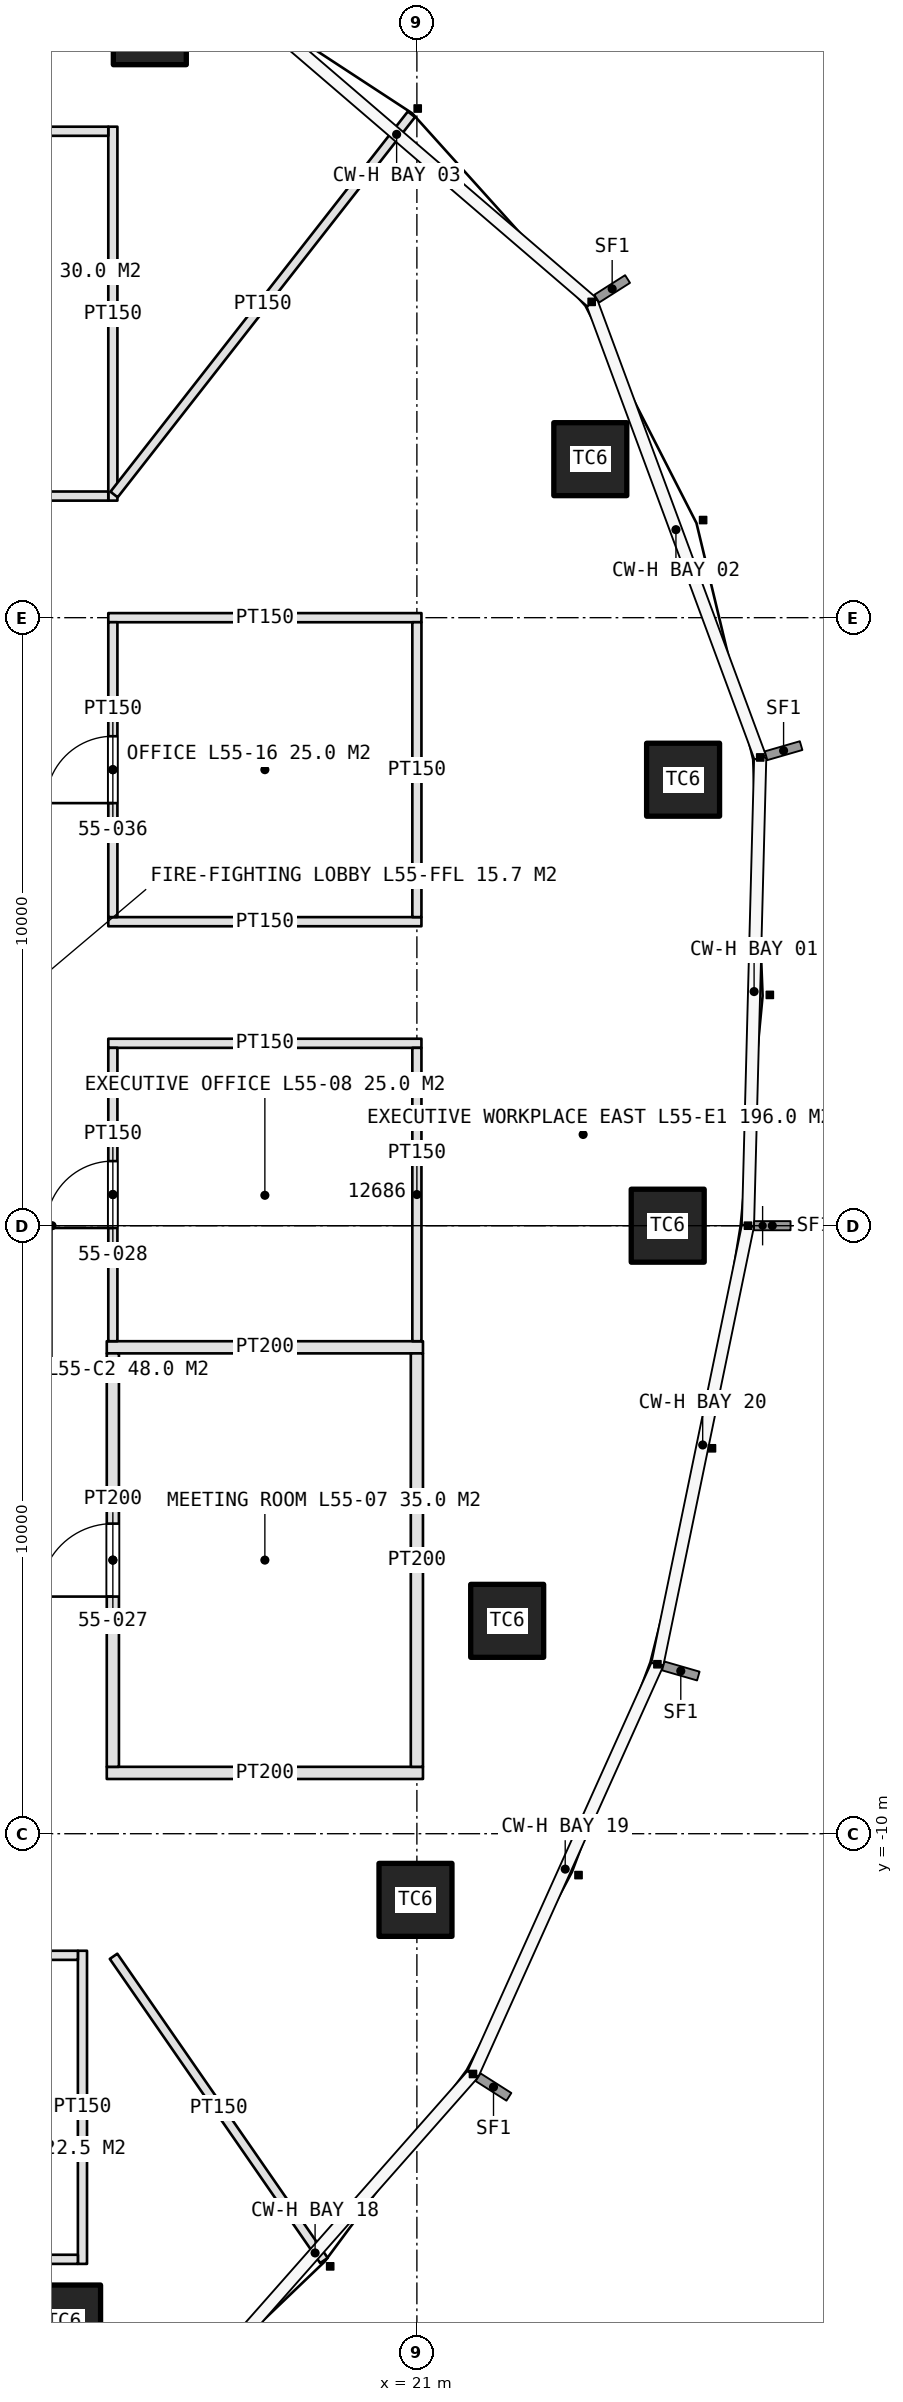
"""IFC4 building model, lengths in metres.
Left out: names, types, materials, properties, quantities, classifications, styles, units other than length and angle.
Written with IfcOpenShell. Run it as: python <this file> out.ifc"""

import sys

from ifc_helpers import new_model, si_unit, direction, frame, frame_2d, origin, origin_2d, place, context, subcontext, project, spatial, rectangle, extrude, element, fill, save


model = new_model("IFC4")
c1 = context("Model", 3, precision=1e-05, world=origin(), true_north=direction((0.0, 1.0)))
c2 = subcontext(c1, "Body", "Model", "MODEL_VIEW")
j1 = project(units=[si_unit("LENGTHUNIT", "METRE"), si_unit("PLANEANGLEUNIT", "RADIAN")], contexts=[c1])
p1 = place(None, origin())
s1 = spatial("IfcSite", under=j1, at=p1, CompositionType="ELEMENT")
p2 = place(p1, origin())
s2 = spatial("IfcBuilding", under=s1, at=p2, CompositionType="ELEMENT")
p3 = place(p2, frame((0.0, 0.0, 249.4)))
s3 = spatial("IfcBuildingStorey", under=s2, at=p3, CompositionType="ELEMENT", Elevation=249.4)
for number, where, z_axis, x_axis in (
    (1, (25.125, 0.0, 0.0), (0.0, 0.0, 1.0), (1.0, 0.0, 0.0)),
    (2, (25.378, 7.335, 0.0), (0.0, 0.0, 1.0), (1.0, 0.0, 0.0)),
    (3, (23.852, 12.607, 0.0), (0.0, 0.0, 1.0), (1.0, 0.0, 0.0)),
    (4, (16.608, 19.695, 0.0), (0.0, 0.0, 1.0), (1.0, 0.0, 0.0)),
    (5, (15.198, -18.023, 0.0), (0.0, 0.0, 1.0), (1.0, 0.0, 0.0)),
    (6, (20.977, -11.088, 0.0), (0.0, 0.0, 1.0), (1.0, 0.0, 0.0)),
    (7, (22.485, -6.499, 0.0), (0.0, 0.0, 1.0), (1.0, 0.0, 0.0)),
):
    element("IfcColumn", number, at=place(p3, frame(where, z_axis=z_axis, x_axis=x_axis)), inside=s3, PredefinedType="COLUMN", context=c2, shape_type="SweptSolid", body=[
        extrude(rectangle(XDim=1.2, YDim=1.2, at=origin_2d()), origin(), (0.0, 0.0, 1.0), 4.2),
    ])
p4 = place(p3, frame((16.0, 11.925, 0.0), z_axis=(0.0, 0.0, 1.0), x_axis=(0.0, 1.0, 0.0)))
e8 = element("IfcWall", 8, at=p4, inside=s3, PredefinedType="PARTITIONING", context=c2, shape_type="SweptSolid", body=[
    extrude(rectangle(XDim=6.15, YDim=0.15, at=frame_2d((3.075, 0.0))), origin(), (0.0, 0.0, 1.0), 3.0),
])
p5 = place(p3, frame((11.075, 12.0, 0.0), z_axis=(0.0, 0.0, 1.0), x_axis=(1.0, 0.0, 0.0)))
e9 = element("IfcWall", 9, at=p5, inside=s3, PredefinedType="PARTITIONING", context=c2, shape_type="SweptSolid", body=[
    extrude(rectangle(XDim=4.85, YDim=0.15, at=frame_2d((2.425, 0.0))), origin(), (0.0, 0.0, 1.0), 3.0),
])
p6 = place(p5, frame((1.875, 0.0, 0.0)))
e10 = element("IfcOpeningElement", 10, at=p6, cuts=e9, PredefinedType="OPENING", context=c2, shape_type="SweptSolid", body=[
    extrude(rectangle(XDim=1.1, YDim=2.3, at=frame_2d((0.55, 1.15))), frame((0.0, 0.085, 0.0), z_axis=(0.0, -1.0, 0.0), x_axis=(1.0, 0.0, 0.0)), (0.0, 0.0, 1.0), 0.17),
])
p7 = place(p3, frame((11.075, 18.0, 0.0), z_axis=(0.0, 0.0, 1.0), x_axis=(1.0, 0.0, 0.0)))
e11 = element("IfcWall", 11, at=p7, inside=s3, PredefinedType="PARTITIONING", context=c2, shape_type="SweptSolid", body=[
    extrude(rectangle(XDim=4.85, YDim=0.15, at=frame_2d((2.425, 0.0))), origin(), (0.0, 0.0, 1.0), 3.0),
])
for number, where, z_axis, x_axis in (
    (12, (15.9, -9.0, 0.0), (0.0, 0.0, 1.0), (1.0, 0.0, 0.0)),
    (13, (15.9, -2.0, 0.0), (0.0, 0.0, 1.0), (1.0, 0.0, 0.0)),
):
    element("IfcWall", number, at=place(p3, frame(where, z_axis=z_axis, x_axis=x_axis)), inside=s3, PredefinedType="PARTITIONING", context=c2, shape_type="SweptSolid", body=[
        extrude(rectangle(XDim=5.2, YDim=0.2, at=frame_2d((2.6, 0.0))), origin(), (0.0, 0.0, 1.0), 3.0),
    ])
p8 = place(p3, frame((15.925, 3.0, 0.0), z_axis=(0.0, 0.0, 1.0), x_axis=(1.0, 0.0, 0.0)))
e14 = element("IfcWall", 14, at=p8, inside=s3, PredefinedType="PARTITIONING", context=c2, shape_type="SweptSolid", body=[
    extrude(rectangle(XDim=5.15, YDim=0.15, at=frame_2d((2.575, 0.0))), origin(), (0.0, 0.0, 1.0), 3.0),
])
p9 = place(p3, frame((16.0, -8.9, 0.0), z_axis=(0.0, 0.0, 1.0), x_axis=(0.0, 1.0, 0.0)))
e15 = element("IfcWall", 15, at=p9, inside=s3, PredefinedType="PARTITIONING", context=c2, shape_type="SweptSolid", body=[
    extrude(rectangle(XDim=6.8, YDim=0.2, at=frame_2d((3.4, 0.0))), origin(), (0.0, 0.0, 1.0), 3.0),
])
p10 = place(p9, frame((2.8, 0.0, 0.0)))
e16 = element("IfcOpeningElement", 16, at=p10, cuts=e15, PredefinedType="OPENING", context=c2, shape_type="SweptSolid", body=[
    extrude(rectangle(XDim=1.2, YDim=2.4, at=frame_2d((0.6, 1.2))), frame((0.0, 0.11, 0.0), z_axis=(0.0, -1.0, 0.0), x_axis=(1.0, 0.0, 0.0)), (0.0, 0.0, 1.0), 0.22),
])
p11 = place(p3, frame((21.0, -8.9, 0.0), z_axis=(0.0, 0.0, 1.0), x_axis=(0.0, 1.0, 0.0)))
e17 = element("IfcWall", 17, at=p11, inside=s3, PredefinedType="PARTITIONING", context=c2, shape_type="SweptSolid", body=[
    extrude(rectangle(XDim=6.8, YDim=0.2, at=frame_2d((3.4, 0.0))), origin(), (0.0, 0.0, 1.0), 3.0),
])
p12 = place(p3, frame((16.0, -1.9, 0.0), z_axis=(0.0, 0.0, 1.0), x_axis=(0.0, 1.0, 0.0)))
e18 = element("IfcWall", 18, at=p12, inside=s3, PredefinedType="PARTITIONING", context=c2, shape_type="SweptSolid", body=[
    extrude(rectangle(XDim=4.825, YDim=0.15, at=frame_2d((2.413, 0.0))), origin(), (0.0, 0.0, 1.0), 3.0),
])
p13 = place(p12, frame((1.863, 0.0, 0.0)))
e19 = element("IfcOpeningElement", 19, at=p13, cuts=e18, PredefinedType="OPENING", context=c2, shape_type="SweptSolid", body=[
    extrude(rectangle(XDim=1.1, YDim=2.3, at=frame_2d((0.55, 1.15))), frame((0.0, 0.085, 0.0), z_axis=(0.0, -1.0, 0.0), x_axis=(1.0, 0.0, 0.0)), (0.0, 0.0, 1.0), 0.17),
])
p14 = place(p3, frame((21.0, -1.9, 0.0), z_axis=(0.0, 0.0, 1.0), x_axis=(0.0, 1.0, 0.0)))
e20 = element("IfcWall", 20, at=p14, inside=s3, PredefinedType="PARTITIONING", context=c2, shape_type="SweptSolid", body=[
    extrude(rectangle(XDim=4.825, YDim=0.15, at=frame_2d((2.413, 0.0))), origin(), (0.0, 0.0, 1.0), 3.0),
])
p15 = place(p3, frame((15.5, -11.925, 0.0), z_axis=(0.0, 0.0, 1.0), x_axis=(0.0, -1.0, 0.0)))
e21 = element("IfcWall", 21, at=p15, inside=s3, PredefinedType="PARTITIONING", context=c2, shape_type="SweptSolid", body=[
    extrude(rectangle(XDim=5.15, YDim=0.15, at=frame_2d((2.575, 0.0))), origin(), (0.0, 0.0, 1.0), 3.0),
])
p16 = place(p3, frame((11.075, -12.0, 0.0), z_axis=(0.0, 0.0, 1.0), x_axis=(1.0, 0.0, 0.0)))
e22 = element("IfcWall", 22, at=p16, inside=s3, PredefinedType="PARTITIONING", context=c2, shape_type="SweptSolid", body=[
    extrude(rectangle(XDim=4.35, YDim=0.15, at=frame_2d((2.175, 0.0))), origin(), (0.0, 0.0, 1.0), 3.0),
])
p17 = place(p16, frame((1.625, 0.0, 0.0)))
e23 = element("IfcOpeningElement", 23, at=p17, cuts=e22, PredefinedType="OPENING", context=c2, shape_type="SweptSolid", body=[
    extrude(rectangle(XDim=1.1, YDim=2.3, at=frame_2d((0.55, 1.15))), frame((0.0, 0.085, 0.0), z_axis=(0.0, -1.0, 0.0), x_axis=(1.0, 0.0, 0.0)), (0.0, 0.0, 1.0), 0.17),
])
p18 = place(p3, frame((11.075, -17.0, 0.0), z_axis=(0.0, 0.0, 1.0), x_axis=(1.0, 0.0, 0.0)))
e24 = element("IfcWall", 24, at=p18, inside=s3, PredefinedType="PARTITIONING", context=c2, shape_type="SweptSolid", body=[
    extrude(rectangle(XDim=4.35, YDim=0.15, at=frame_2d((2.175, 0.0))), origin(), (0.0, 0.0, 1.0), 3.0),
])
for number, where, z_axis, x_axis in (
    (25, (15.925, 5.0, 0.0), (0.0, 0.0, 1.0), (1.0, 0.0, 0.0)),
    (26, (15.925, 10.0, 0.0), (0.0, 0.0, 1.0), (1.0, 0.0, 0.0)),
):
    element("IfcWall", number, at=place(p3, frame(where, z_axis=z_axis, x_axis=x_axis)), inside=s3, PredefinedType="PARTITIONING", context=c2, shape_type="SweptSolid", body=[
        extrude(rectangle(XDim=5.15, YDim=0.15, at=frame_2d((2.575, 0.0))), origin(), (0.0, 0.0, 1.0), 3.0),
    ])
p19 = place(p3, frame((16.0, 5.075, 0.0), z_axis=(0.0, 0.0, 1.0), x_axis=(0.0, 1.0, 0.0)))
e27 = element("IfcWall", 27, at=p19, inside=s3, PredefinedType="PARTITIONING", context=c2, shape_type="SweptSolid", body=[
    extrude(rectangle(XDim=4.85, YDim=0.15, at=frame_2d((2.425, 0.0))), origin(), (0.0, 0.0, 1.0), 3.0),
])
p20 = place(p19, frame((1.875, 0.0, 0.0)))
e28 = element("IfcOpeningElement", 28, at=p20, cuts=e27, PredefinedType="OPENING", context=c2, shape_type="SweptSolid", body=[
    extrude(rectangle(XDim=1.1, YDim=2.3, at=frame_2d((0.55, 1.15))), frame((0.0, 0.085, 0.0), z_axis=(0.0, -1.0, 0.0), x_axis=(1.0, 0.0, 0.0)), (0.0, 0.0, 1.0), 0.17),
])
p21 = place(p3, frame((21.0, 5.075, 0.0), z_axis=(0.0, 0.0, 1.0), x_axis=(0.0, 1.0, 0.0)))
e29 = element("IfcWall", 29, at=p21, inside=s3, PredefinedType="PARTITIONING", context=c2, shape_type="SweptSolid", body=[
    extrude(rectangle(XDim=4.85, YDim=0.15, at=frame_2d((2.425, 0.0))), origin(), (0.0, 0.0, 1.0), 3.0),
])
p22 = place(p3, frame((16.011, -12.016, 0.0), z_axis=(0.0, 0.0, 1.0), x_axis=(0.568863489071, -0.822431961199, 0.0)))
e30 = element("IfcWall", 30, at=p22, inside=s3, PredefinedType="PARTITIONING", context=c2, shape_type="SweptSolid", body=[
    extrude(rectangle(XDim=6.083, YDim=0.15, at=frame_2d((3.042, 0.0))), origin(), (0.0, 0.0, 1.0), 3.0),
])
p23 = place(p3, frame((16.02, 12.026, 0.0), z_axis=(0.0, 0.0, 1.0), x_axis=(0.616031272047, 0.787721696959, 0.0)))
e31 = element("IfcWall", 31, at=p23, inside=s3, PredefinedType="PARTITIONING", context=c2, shape_type="SweptSolid", body=[
    extrude(rectangle(XDim=7.939, YDim=0.15, at=frame_2d((3.969, 0.0))), origin(), (0.0, 0.0, 1.0), 3.0),
])
p24 = place(p10, origin())
e32 = element("IfcDoor", 32, at=p24, inside=s3, OperationType="SINGLE_SWING_LEFT", PredefinedType="DOOR", context=c2, shape_type="SweptSolid", body=[
    extrude(rectangle(XDim=1.2, YDim=2.4, at=frame_2d((0.6, 1.2))), frame((0.0, 0.025, 0.0), z_axis=(0.0, -1.0, 0.0), x_axis=(1.0, 0.0, 0.0)), (0.0, 0.0, 1.0), 0.05),
])
fill(e16, e32)
p25 = place(p13, origin())
e33 = element("IfcDoor", 33, at=p25, inside=s3, OperationType="SINGLE_SWING_LEFT", PredefinedType="DOOR", context=c2, shape_type="SweptSolid", body=[
    extrude(rectangle(XDim=1.1, YDim=2.3, at=frame_2d((0.55, 1.15))), frame((0.0, 0.025, 0.0), z_axis=(0.0, -1.0, 0.0), x_axis=(1.0, 0.0, 0.0)), (0.0, 0.0, 1.0), 0.05),
])
fill(e19, e33)
p26 = place(p20, origin())
e34 = element("IfcDoor", 34, at=p26, inside=s3, OperationType="SINGLE_SWING_LEFT", PredefinedType="DOOR", context=c2, shape_type="SweptSolid", body=[
    extrude(rectangle(XDim=1.1, YDim=2.3, at=frame_2d((0.55, 1.15))), frame((0.0, 0.025, 0.0), z_axis=(0.0, -1.0, 0.0), x_axis=(1.0, 0.0, 0.0)), (0.0, 0.0, 1.0), 0.05),
])
fill(e28, e34)
save(model, sys.argv[1])
